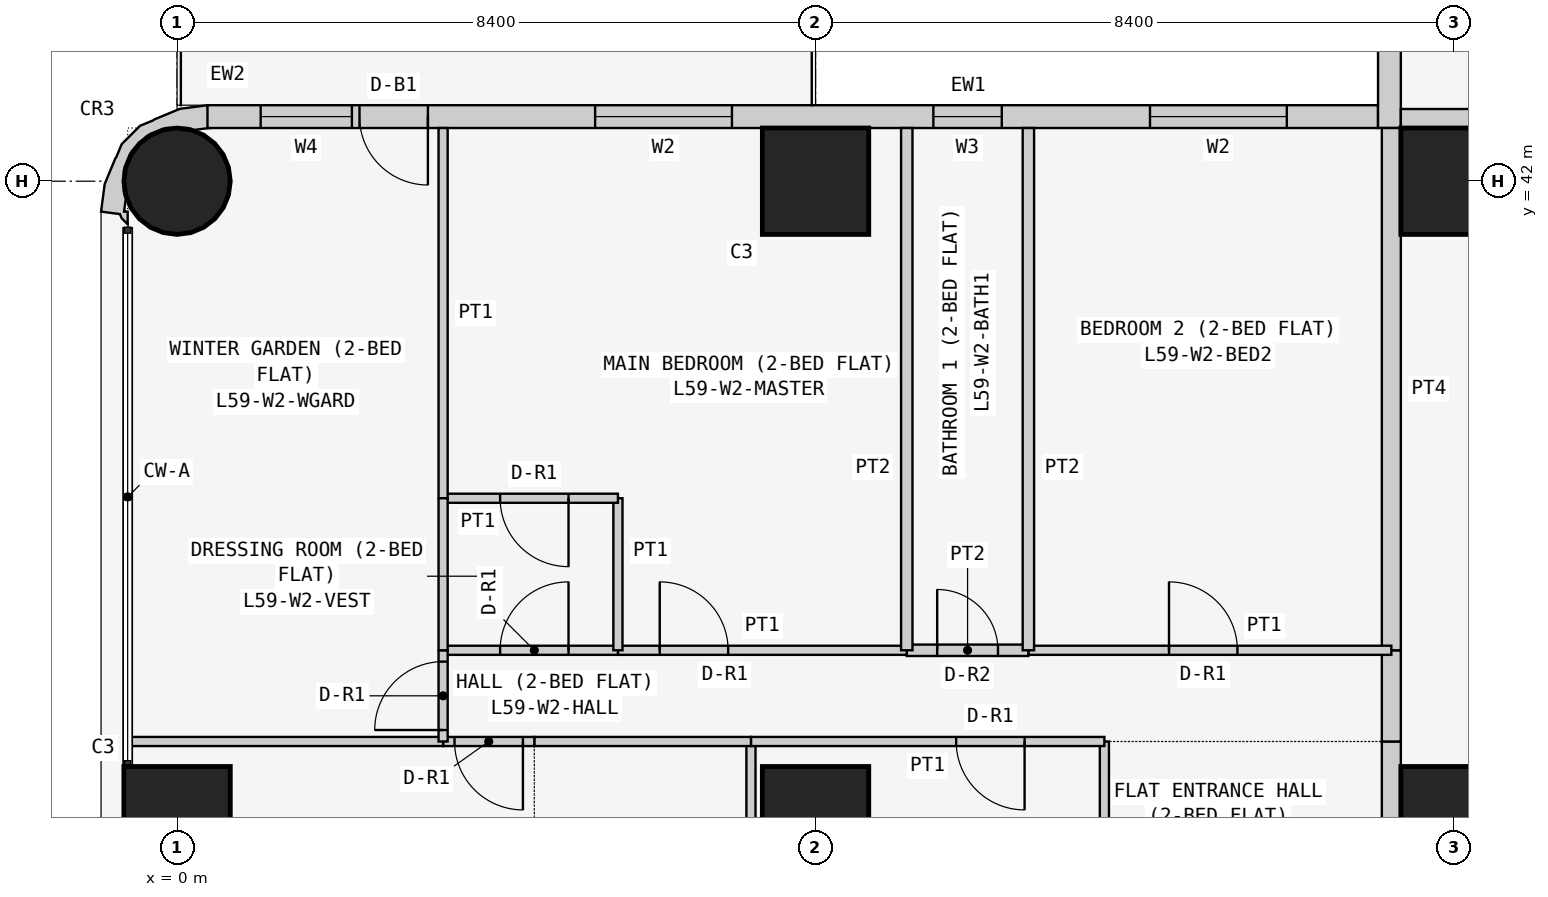
"""IFC4 building model, lengths in metres.
Left out: names, types, materials, properties, quantities, classifications, styles, units other than length and angle.
Written with IfcOpenShell. Run it as: python <this file> out.ifc"""

import sys

from ifc_helpers import new_model, si_unit, direction, frame, frame_2d, origin, origin_2d, place, context, subcontext, project, spatial, polyline, rectangle, circle, outline, extrude, element, fill, save


model = new_model("IFC4")
c1 = context("Model", 3, precision=1e-05, world=origin(), true_north=direction((0.0, 1.0)))
c2 = subcontext(c1, "Body", "Model", "MODEL_VIEW")
j1 = project(units=[si_unit("LENGTHUNIT", "METRE"), si_unit("PLANEANGLEUNIT", "RADIAN")], contexts=[c1])
p1 = place(None, origin())
s1 = spatial("IfcSite", under=j1, at=p1, CompositionType="ELEMENT")
p2 = place(p1, origin())
s2 = spatial("IfcBuilding", under=s1, at=p2, CompositionType="ELEMENT")
p3 = place(p2, frame((0.0, 0.0, 226.5)))
s3 = spatial("IfcBuildingStorey", under=s2, at=p3, CompositionType="ELEMENT", Elevation=226.5)
p4 = place(p3, frame((0.0, 33.6, 0.0), z_axis=(0.0, 0.0, 1.0), x_axis=(1.0, 0.0, 0.0)))
e1 = element("IfcColumn", 1, at=p4, inside=s3, PredefinedType="COLUMN", context=c2, shape_type="SweptSolid", body=[
    extrude(rectangle(XDim=1.4, YDim=1.4, at=origin_2d()), origin(), (0.0, 0.0, 1.0), 3.6),
])
p5 = place(p3, frame((0.0, 42.0, 0.0), z_axis=(0.0, 0.0, 1.0), x_axis=(1.0, 0.0, 0.0)))
e2 = element("IfcColumn", 2, at=p5, inside=s3, PredefinedType="COLUMN", context=c2, shape_type="SweptSolid", body=[
    extrude(circle(Radius=0.7, at=origin_2d()), origin(), (0.0, 0.0, 1.0), 3.6),
])
for number, where, z_axis, x_axis in (
    (3, (8.4, 33.6, 0.0), (0.0, 0.0, 1.0), (1.0, 0.0, 0.0)),
    (4, (8.4, 42.0, 0.0), (0.0, 0.0, 1.0), (1.0, 0.0, 0.0)),
    (5, (16.8, 33.6, 0.0), (0.0, 0.0, 1.0), (1.0, 0.0, 0.0)),
    (6, (16.8, 42.0, 0.0), (0.0, 0.0, 1.0), (1.0, 0.0, 0.0)),
):
    element("IfcColumn", number, at=place(p3, frame(where, z_axis=z_axis, x_axis=x_axis)), inside=s3, PredefinedType="COLUMN", context=c2, shape_type="SweptSolid", body=[
        extrude(rectangle(XDim=1.4, YDim=1.4, at=origin_2d()), origin(), (0.0, 0.0, 1.0), 3.6),
    ])
p6 = place(p3, frame((15.8, 42.85, 0.0), z_axis=(0.0, 0.0, 1.0), x_axis=(-1.0, 0.0, 0.0)))
e7 = element("IfcWall", 7, at=p6, inside=s3, PredefinedType="SOLIDWALL", context=c2, shape_type="SweptSolid", body=[
    extrude(rectangle(XDim=15.4, YDim=0.3, at=frame_2d((7.7, 0.0))), origin(), (0.0, 0.0, 1.0), 3.45),
])
p7 = place(p6, frame((1.2, 0.0, 0.9)))
e8 = element("IfcOpeningElement", 8, at=p7, cuts=e7, PredefinedType="OPENING", context=c2, shape_type="SweptSolid", body=[
    extrude(rectangle(XDim=1.8, YDim=1.5, at=frame_2d((0.9, 0.75))), frame((0.0, 0.16, 0.0), z_axis=(0.0, -1.0, 0.0), x_axis=(1.0, 0.0, 0.0)), (0.0, 0.0, 1.0), 0.32),
])
p8 = place(p6, frame((4.95, 0.0, 1.5)))
e9 = element("IfcOpeningElement", 9, at=p8, cuts=e7, PredefinedType="OPENING", context=c2, shape_type="SweptSolid", body=[
    extrude(rectangle(XDim=0.9, YDim=0.7, at=frame_2d((0.45, 0.35))), frame((0.0, 0.16, 0.0), z_axis=(0.0, -1.0, 0.0), x_axis=(1.0, 0.0, 0.0)), (0.0, 0.0, 1.0), 0.32),
])
p9 = place(p6, frame((8.5, 0.0, 0.9)))
e10 = element("IfcOpeningElement", 10, at=p9, cuts=e7, PredefinedType="OPENING", context=c2, shape_type="SweptSolid", body=[
    extrude(rectangle(XDim=1.8, YDim=1.5, at=frame_2d((0.9, 0.75))), frame((0.0, 0.16, 0.0), z_axis=(0.0, -1.0, 0.0), x_axis=(1.0, 0.0, 0.0)), (0.0, 0.0, 1.0), 0.32),
])
p10 = place(p6, frame((12.5, 0.0, 0.0)))
e11 = element("IfcOpeningElement", 11, at=p10, cuts=e7, PredefinedType="OPENING", context=c2, shape_type="SweptSolid", body=[
    extrude(rectangle(XDim=0.9, YDim=2.4, at=frame_2d((0.45, 1.2))), frame((0.0, 0.16, 0.0), z_axis=(0.0, -1.0, 0.0), x_axis=(1.0, 0.0, 0.0)), (0.0, 0.0, 1.0), 0.32),
])
p11 = place(p6, frame((13.5, 0.0, 0.9)))
e12 = element("IfcOpeningElement", 12, at=p11, cuts=e7, PredefinedType="OPENING", context=c2, shape_type="SweptSolid", body=[
    extrude(rectangle(XDim=1.2, YDim=1.5, at=frame_2d((0.6, 0.75))), frame((0.0, 0.16, 0.0), z_axis=(0.0, -1.0, 0.0), x_axis=(1.0, 0.0, 0.0)), (0.0, 0.0, 1.0), 0.32),
])
p12 = place(p3, frame((15.95, 50.0, 0.0), z_axis=(0.0, 0.0, 1.0), x_axis=(0.0, -1.0, 0.0)))
e13 = element("IfcWall", 13, at=p12, inside=s3, PredefinedType="SOLIDWALL", context=c2, shape_type="SweptSolid", body=[
    extrude(rectangle(XDim=7.3, YDim=0.3, at=frame_2d((3.65, 0.0))), origin(), (0.0, 0.0, 1.0), 3.45),
])
p13 = place(p12, frame((3.1, 0.0, 0.9)))
e14 = element("IfcOpeningElement", 14, at=p13, cuts=e13, PredefinedType="OPENING", context=c2, shape_type="SweptSolid", body=[
    extrude(rectangle(XDim=2.4, YDim=1.5, at=frame_2d((1.2, 0.75))), frame((0.0, 0.16, 0.0), z_axis=(0.0, -1.0, 0.0), x_axis=(1.0, 0.0, 0.0)), (0.0, 0.0, 1.0), 0.32),
])
p14 = place(p12, frame((0.75, 0.0, 0.9)))
e15 = element("IfcOpeningElement", 15, at=p14, cuts=e13, PredefinedType="OPENING", context=c2, shape_type="SweptSolid", body=[
    extrude(rectangle(XDim=1.2, YDim=1.5, at=frame_2d((0.6, 0.75))), frame((0.0, 0.16, 0.0), z_axis=(0.0, -1.0, 0.0), x_axis=(1.0, 0.0, 0.0)), (0.0, 0.0, 1.0), 0.32),
])
p15 = place(p3, frame((0.29, 42.724, 0.0), z_axis=(0.0, 0.0, 1.0), x_axis=(-0.898030234854, 0.439933741929, 0.0)))
e16 = element("IfcWall", 16, at=p15, inside=s3, PredefinedType="SOLIDWALL", context=c2, shape_type="SweptSolid", body=[
    extrude(outline(polyline([(-0.145, -0.044), (0.022, -0.296), (0.327, -0.094), (0.568, 0.18), (0.578, 0.199), (0.7, 0.338), (0.811, 0.661), (0.799, 0.846), (0.803, 0.866), (0.78, 1.231), (0.664, 1.577), (0.426, 1.497), (0.382, 1.536), (0.276, 1.572), (0.349, 1.423), (0.392, 1.444), (0.453, 1.261), (0.51, 1.211), (0.632, 0.961), (0.65, 0.683), (0.56, 0.419), (0.375, 0.21), (0.125, 0.087), (0.05, 0.082), (-0.127, -0.035), (-0.145, -0.044)])), origin(), (0.0, 0.0, 1.0), 3.45),
])
p16 = place(p3, frame((16.1, 42.825, 0.0), z_axis=(0.0, 0.0, 1.0), x_axis=(1.0, 0.0, 0.0)))
e17 = element("IfcWall", 17, at=p16, inside=s3, PredefinedType="PARTITIONING", context=c2, shape_type="SweptSolid", body=[
    extrude(rectangle(XDim=6.871, YDim=0.25, at=frame_2d((3.436, 0.0))), origin(), (0.0, 0.0, 1.0), 3.45),
])
p17 = place(p3, frame((15.975, 29.4, 0.0), z_axis=(0.0, 0.0, 1.0), x_axis=(0.0, 1.0, 0.0)))
e18 = element("IfcWall", 18, at=p17, inside=s3, PredefinedType="PARTITIONING", context=c2, shape_type="SweptSolid", body=[
    extrude(rectangle(XDim=5.229, YDim=0.25, at=frame_2d((2.615, 0.0))), origin(), (0.0, 0.0, 1.0), 3.45),
])
p18 = place(p17, frame((2.1, 0.0, 0.0)))
e19 = element("IfcOpeningElement", 19, at=p18, cuts=e18, PredefinedType="OPENING", context=c2, shape_type="SweptSolid", body=[
    extrude(rectangle(XDim=1.0, YDim=2.1, at=frame_2d((0.5, 1.05))), frame((0.0, 0.135, 0.0), z_axis=(0.0, -1.0, 0.0), x_axis=(1.0, 0.0, 0.0)), (0.0, 0.0, 1.0), 0.27),
])
p19 = place(p3, frame((15.975, 34.629, 0.0), z_axis=(0.0, 0.0, 1.0), x_axis=(0.0, 1.0, 0.0)))
e20 = element("IfcWall", 20, at=p19, inside=s3, PredefinedType="PARTITIONING", context=c2, shape_type="SweptSolid", body=[
    extrude(rectangle(XDim=1.2, YDim=0.25, at=frame_2d((0.6, 0.0))), origin(), (0.0, 0.0, 1.0), 3.45),
])
p20 = place(p3, frame((15.975, 35.829, 0.0), z_axis=(0.0, 0.0, 1.0), x_axis=(0.0, 1.0, 0.0)))
e21 = element("IfcWall", 21, at=p20, inside=s3, PredefinedType="PARTITIONING", context=c2, shape_type="SweptSolid", body=[
    extrude(rectangle(XDim=6.871, YDim=0.25, at=frame_2d((3.436, 0.0))), origin(), (0.0, 0.0, 1.0), 3.45),
])
for number, where, z_axis, x_axis in (
    (22, (12.2, 29.4, 0.0), (0.0, 0.0, 1.0), (0.0, 1.0, 0.0)),
    (23, (7.55, 29.4, 0.0), (0.0, 0.0, 1.0), (0.0, 1.0, 0.0)),
):
    element("IfcWall", number, at=place(p3, frame(where, z_axis=z_axis, x_axis=x_axis)), inside=s3, PredefinedType="PARTITIONING", context=c2, shape_type="SweptSolid", body=[
        extrude(rectangle(XDim=5.229, YDim=0.12, at=frame_2d((2.615, 0.0))), origin(), (0.0, 0.0, 1.0), 3.45),
    ])
p21 = place(p3, frame((7.55, 34.629, 0.0), z_axis=(0.0, 0.0, 1.0), x_axis=(1.0, 0.0, 0.0)))
e24 = element("IfcWall", 24, at=p21, inside=s3, PredefinedType="PARTITIONING", context=c2, shape_type="SweptSolid", body=[
    extrude(rectangle(XDim=4.65, YDim=0.12, at=frame_2d((2.325, 0.0))), origin(), (0.0, 0.0, 1.0), 3.45),
])
p22 = place(p21, frame((2.7, 0.0, 0.0)))
e25 = element("IfcOpeningElement", 25, at=p22, cuts=e24, PredefinedType="OPENING", context=c2, shape_type="SweptSolid", body=[
    extrude(rectangle(XDim=0.9, YDim=2.1, at=frame_2d((0.45, 1.05))), frame((0.0, 0.07, 0.0), z_axis=(0.0, -1.0, 0.0), x_axis=(1.0, 0.0, 0.0)), (0.0, 0.0, 1.0), 0.14),
])
p23 = place(p3, frame((4.7, 34.629, 0.0), z_axis=(0.0, 0.0, 1.0), x_axis=(1.0, 0.0, 0.0)))
e26 = element("IfcWall", 26, at=p23, inside=s3, PredefinedType="PARTITIONING", context=c2, shape_type="SweptSolid", body=[
    extrude(rectangle(XDim=2.85, YDim=0.12, at=frame_2d((1.425, 0.0))), origin(), (0.0, 0.0, 1.0), 3.45),
])
p24 = place(p3, frame((3.5, 34.629, 0.0), z_axis=(0.0, 0.0, 1.0), x_axis=(1.0, 0.0, 0.0)))
e27 = element("IfcWall", 27, at=p24, inside=s3, PredefinedType="PARTITIONING", context=c2, shape_type="SweptSolid", body=[
    extrude(rectangle(XDim=1.2, YDim=0.12, at=frame_2d((0.6, 0.0))), origin(), (0.0, 0.0, 1.0), 3.45),
])
p25 = place(p24, frame((0.15, 0.0, 0.0)))
e28 = element("IfcOpeningElement", 28, at=p25, cuts=e27, PredefinedType="OPENING", context=c2, shape_type="SweptSolid", body=[
    extrude(rectangle(XDim=0.9, YDim=2.1, at=frame_2d((0.45, 1.05))), frame((0.0, 0.07, 0.0), z_axis=(0.0, -1.0, 0.0), x_axis=(1.0, 0.0, 0.0)), (0.0, 0.0, 1.0), 0.14),
])
p26 = place(p3, frame((-0.65, 34.629, 0.0), z_axis=(0.0, 0.0, 1.0), x_axis=(1.0, 0.0, 0.0)))
e29 = element("IfcWall", 29, at=p26, inside=s3, PredefinedType="PARTITIONING", context=c2, shape_type="SweptSolid", body=[
    extrude(rectangle(XDim=4.15, YDim=0.12, at=frame_2d((2.075, 0.0))), origin(), (0.0, 0.0, 1.0), 3.45),
])
p27 = place(p3, frame((11.2, 35.829, 0.0), z_axis=(0.0, 0.0, 1.0), x_axis=(1.0, 0.0, 0.0)))
e30 = element("IfcWall", 30, at=p27, inside=s3, PredefinedType="PARTITIONING", context=c2, shape_type="SweptSolid", body=[
    extrude(rectangle(XDim=4.775, YDim=0.12, at=frame_2d((2.388, 0.0))), origin(), (0.0, 0.0, 1.0), 3.45),
])
p28 = place(p27, frame((1.85, 0.0, 0.0)))
e31 = element("IfcOpeningElement", 31, at=p28, cuts=e30, PredefinedType="OPENING", context=c2, shape_type="SweptSolid", body=[
    extrude(rectangle(XDim=0.9, YDim=2.1, at=frame_2d((0.45, 1.05))), frame((0.0, 0.07, 0.0), z_axis=(0.0, -1.0, 0.0), x_axis=(1.0, 0.0, 0.0)), (0.0, 0.0, 1.0), 0.14),
])
p29 = place(p3, frame((9.6, 35.829, 0.0), z_axis=(0.0, 0.0, 1.0), x_axis=(1.0, 0.0, 0.0)))
e32 = element("IfcWall", 32, at=p29, inside=s3, PredefinedType="PARTITIONING", context=c2, shape_type="SweptSolid", body=[
    extrude(rectangle(XDim=1.6, YDim=0.15, at=frame_2d((0.8, 0.0))), origin(), (0.0, 0.0, 1.0), 3.45),
])
p30 = place(p29, frame((0.4, 0.0, 0.0)))
e33 = element("IfcOpeningElement", 33, at=p30, cuts=e32, PredefinedType="OPENING", context=c2, shape_type="SweptSolid", body=[
    extrude(rectangle(XDim=0.8, YDim=2.1, at=frame_2d((0.4, 1.05))), frame((0.0, 0.085, 0.0), z_axis=(0.0, -1.0, 0.0), x_axis=(1.0, 0.0, 0.0)), (0.0, 0.0, 1.0), 0.17),
])
p31 = place(p3, frame((5.8, 35.829, 0.0), z_axis=(0.0, 0.0, 1.0), x_axis=(1.0, 0.0, 0.0)))
e34 = element("IfcWall", 34, at=p31, inside=s3, PredefinedType="PARTITIONING", context=c2, shape_type="SweptSolid", body=[
    extrude(rectangle(XDim=3.8, YDim=0.12, at=frame_2d((1.9, 0.0))), origin(), (0.0, 0.0, 1.0), 3.45),
])
p32 = place(p31, frame((0.55, 0.0, 0.0)))
e35 = element("IfcOpeningElement", 35, at=p32, cuts=e34, PredefinedType="OPENING", context=c2, shape_type="SweptSolid", body=[
    extrude(rectangle(XDim=0.9, YDim=2.1, at=frame_2d((0.45, 1.05))), frame((0.0, 0.07, 0.0), z_axis=(0.0, -1.0, 0.0), x_axis=(1.0, 0.0, 0.0)), (0.0, 0.0, 1.0), 0.14),
])
p33 = place(p3, frame((3.5, 35.829, 0.0), z_axis=(0.0, 0.0, 1.0), x_axis=(1.0, 0.0, 0.0)))
e36 = element("IfcWall", 36, at=p33, inside=s3, PredefinedType="PARTITIONING", context=c2, shape_type="SweptSolid", body=[
    extrude(rectangle(XDim=2.3, YDim=0.12, at=frame_2d((1.15, 0.0))), origin(), (0.0, 0.0, 1.0), 3.45),
])
p34 = place(p33, frame((0.75, 0.0, 0.0)))
e37 = element("IfcOpeningElement", 37, at=p34, cuts=e36, PredefinedType="OPENING", context=c2, shape_type="SweptSolid", body=[
    extrude(rectangle(XDim=0.9, YDim=2.1, at=frame_2d((0.45, 1.05))), frame((0.0, 0.07, 0.0), z_axis=(0.0, -1.0, 0.0), x_axis=(1.0, 0.0, 0.0)), (0.0, 0.0, 1.0), 0.14),
])
p35 = place(p3, frame((3.5, 34.629, 0.0), z_axis=(0.0, 0.0, 1.0), x_axis=(0.0, 1.0, 0.0)))
e38 = element("IfcWall", 38, at=p35, inside=s3, PredefinedType="PARTITIONING", context=c2, shape_type="SweptSolid", body=[
    extrude(rectangle(XDim=1.2, YDim=0.12, at=frame_2d((0.6, 0.0))), origin(), (0.0, 0.0, 1.0), 3.45),
])
p36 = place(p35, frame((0.151, 0.0, 0.0)))
e39 = element("IfcOpeningElement", 39, at=p36, cuts=e38, PredefinedType="OPENING", context=c2, shape_type="SweptSolid", body=[
    extrude(rectangle(XDim=0.9, YDim=2.1, at=frame_2d((0.45, 1.05))), frame((0.0, 0.07, 0.0), z_axis=(0.0, -1.0, 0.0), x_axis=(1.0, 0.0, 0.0)), (0.0, 0.0, 1.0), 0.14),
])
for number, where, z_axis, x_axis in (
    (40, (11.2, 35.829, 0.0), (0.0, 0.0, 1.0), (0.0, 1.0, 0.0)),
    (41, (9.6, 35.829, 0.0), (0.0, 0.0, 1.0), (0.0, 1.0, 0.0)),
):
    element("IfcWall", number, at=place(p3, frame(where, z_axis=z_axis, x_axis=x_axis)), inside=s3, PredefinedType="PARTITIONING", context=c2, shape_type="SweptSolid", body=[
        extrude(rectangle(XDim=6.871, YDim=0.15, at=frame_2d((3.436, 0.0))), origin(), (0.0, 0.0, 1.0), 3.45),
    ])
p37 = place(p3, frame((5.8, 35.829, 0.0), z_axis=(0.0, 0.0, 1.0), x_axis=(0.0, 1.0, 0.0)))
e42 = element("IfcWall", 42, at=p37, inside=s3, PredefinedType="PARTITIONING", context=c2, shape_type="SweptSolid", body=[
    extrude(rectangle(XDim=2.0, YDim=0.12, at=frame_2d((1.0, 0.0))), origin(), (0.0, 0.0, 1.0), 3.45),
])
p38 = place(p3, frame((5.8, 37.829, 0.0), z_axis=(0.0, 0.0, 1.0), x_axis=(-1.0, 0.0, 0.0)))
e43 = element("IfcWall", 43, at=p38, inside=s3, PredefinedType="PARTITIONING", context=c2, shape_type="SweptSolid", body=[
    extrude(rectangle(XDim=2.3, YDim=0.12, at=frame_2d((1.15, 0.0))), origin(), (0.0, 0.0, 1.0), 3.45),
])
p39 = place(p38, frame((0.65, 0.0, 0.0)))
e44 = element("IfcOpeningElement", 44, at=p39, cuts=e43, PredefinedType="OPENING", context=c2, shape_type="SweptSolid", body=[
    extrude(rectangle(XDim=0.9, YDim=2.1, at=frame_2d((0.45, 1.05))), frame((0.0, 0.07, 0.0), z_axis=(0.0, -1.0, 0.0), x_axis=(1.0, 0.0, 0.0)), (0.0, 0.0, 1.0), 0.14),
])
p40 = place(p3, frame((3.5, 37.829, 0.0), z_axis=(0.0, 0.0, 1.0), x_axis=(0.0, 1.0, 0.0)))
e45 = element("IfcWall", 45, at=p40, inside=s3, PredefinedType="PARTITIONING", context=c2, shape_type="SweptSolid", body=[
    extrude(rectangle(XDim=4.871, YDim=0.12, at=frame_2d((2.436, 0.0))), origin(), (0.0, 0.0, 1.0), 3.45),
])
p41 = place(p3, frame((3.5, 35.829, 0.0), z_axis=(0.0, 0.0, 1.0), x_axis=(0.0, 1.0, 0.0)))
e46 = element("IfcWall", 46, at=p41, inside=s3, PredefinedType="PARTITIONING", context=c2, shape_type="SweptSolid", body=[
    extrude(rectangle(XDim=2.0, YDim=0.12, at=frame_2d((1.0, 0.0))), origin(), (0.0, 0.0, 1.0), 3.45),
])
p42 = place(p7, origin())
e47 = element("IfcWindow", 47, at=p42, inside=s3, PartitioningType="SINGLE_PANEL", PredefinedType="WINDOW", context=c2, shape_type="SweptSolid", body=[
    extrude(rectangle(XDim=1.8, YDim=1.5, at=frame_2d((0.9, 0.75))), frame((0.0, 0.03, 0.0), z_axis=(0.0, -1.0, 0.0), x_axis=(1.0, 0.0, 0.0)), (0.0, 0.0, 1.0), 0.06),
])
fill(e8, e47)
p43 = place(p8, origin())
e48 = element("IfcWindow", 48, at=p43, inside=s3, PartitioningType="SINGLE_PANEL", PredefinedType="WINDOW", context=c2, shape_type="SweptSolid", body=[
    extrude(rectangle(XDim=0.9, YDim=0.7, at=frame_2d((0.45, 0.35))), frame((0.0, 0.03, 0.0), z_axis=(0.0, -1.0, 0.0), x_axis=(1.0, 0.0, 0.0)), (0.0, 0.0, 1.0), 0.06),
])
fill(e9, e48)
p44 = place(p9, origin())
e49 = element("IfcWindow", 49, at=p44, inside=s3, PartitioningType="SINGLE_PANEL", PredefinedType="WINDOW", context=c2, shape_type="SweptSolid", body=[
    extrude(rectangle(XDim=1.8, YDim=1.5, at=frame_2d((0.9, 0.75))), frame((0.0, 0.03, 0.0), z_axis=(0.0, -1.0, 0.0), x_axis=(1.0, 0.0, 0.0)), (0.0, 0.0, 1.0), 0.06),
])
fill(e10, e49)
p45 = place(p10, origin())
e50 = element("IfcDoor", 50, at=p45, inside=s3, OperationType="SINGLE_SWING_LEFT", PredefinedType="DOOR", context=c2, shape_type="SweptSolid", body=[
    extrude(rectangle(XDim=0.9, YDim=2.4, at=frame_2d((0.45, 1.2))), frame((0.0, 0.025, 0.0), z_axis=(0.0, -1.0, 0.0), x_axis=(1.0, 0.0, 0.0)), (0.0, 0.0, 1.0), 0.05),
])
fill(e11, e50)
p46 = place(p11, origin())
e51 = element("IfcWindow", 51, at=p46, inside=s3, PartitioningType="SINGLE_PANEL", PredefinedType="WINDOW", context=c2, shape_type="SweptSolid", body=[
    extrude(rectangle(XDim=1.2, YDim=1.5, at=frame_2d((0.6, 0.75))), frame((0.0, 0.03, 0.0), z_axis=(0.0, -1.0, 0.0), x_axis=(1.0, 0.0, 0.0)), (0.0, 0.0, 1.0), 0.06),
])
fill(e12, e51)
p47 = place(p22, frame((0.9, 0.0, 0.0), z_axis=(0.0, 0.0, 1.0), x_axis=(-1.0, 0.0, 0.0)))
e52 = element("IfcDoor", 52, at=p47, inside=s3, OperationType="SINGLE_SWING_LEFT", PredefinedType="DOOR", context=c2, shape_type="SweptSolid", body=[
    extrude(rectangle(XDim=0.9, YDim=2.1, at=frame_2d((0.45, 1.05))), frame((0.0, 0.025, 0.0), z_axis=(0.0, -1.0, 0.0), x_axis=(1.0, 0.0, 0.0)), (0.0, 0.0, 1.0), 0.05),
])
fill(e25, e52)
p48 = place(p25, frame((0.9, 0.0, 0.0), z_axis=(0.0, 0.0, 1.0), x_axis=(-1.0, 0.0, 0.0)))
e53 = element("IfcDoor", 53, at=p48, inside=s3, OperationType="SINGLE_SWING_LEFT", PredefinedType="DOOR", context=c2, shape_type="SweptSolid", body=[
    extrude(rectangle(XDim=0.9, YDim=2.1, at=frame_2d((0.45, 1.05))), frame((0.0, 0.025, 0.0), z_axis=(0.0, -1.0, 0.0), x_axis=(1.0, 0.0, 0.0)), (0.0, 0.0, 1.0), 0.05),
])
fill(e28, e53)
p49 = place(p28, origin())
e54 = element("IfcDoor", 54, at=p49, inside=s3, OperationType="SINGLE_SWING_LEFT", PredefinedType="DOOR", context=c2, shape_type="SweptSolid", body=[
    extrude(rectangle(XDim=0.9, YDim=2.1, at=frame_2d((0.45, 1.05))), frame((0.0, 0.025, 0.0), z_axis=(0.0, -1.0, 0.0), x_axis=(1.0, 0.0, 0.0)), (0.0, 0.0, 1.0), 0.05),
])
fill(e31, e54)
p50 = place(p30, origin())
e55 = element("IfcDoor", 55, at=p50, inside=s3, OperationType="SINGLE_SWING_LEFT", PredefinedType="DOOR", context=c2, shape_type="SweptSolid", body=[
    extrude(rectangle(XDim=0.8, YDim=2.1, at=frame_2d((0.4, 1.05))), frame((0.0, 0.025, 0.0), z_axis=(0.0, -1.0, 0.0), x_axis=(1.0, 0.0, 0.0)), (0.0, 0.0, 1.0), 0.05),
])
fill(e33, e55)
p51 = place(p32, origin())
e56 = element("IfcDoor", 56, at=p51, inside=s3, OperationType="SINGLE_SWING_LEFT", PredefinedType="DOOR", context=c2, shape_type="SweptSolid", body=[
    extrude(rectangle(XDim=0.9, YDim=2.1, at=frame_2d((0.45, 1.05))), frame((0.0, 0.025, 0.0), z_axis=(0.0, -1.0, 0.0), x_axis=(1.0, 0.0, 0.0)), (0.0, 0.0, 1.0), 0.05),
])
fill(e35, e56)
p52 = place(p34, origin())
e57 = element("IfcDoor", 57, at=p52, inside=s3, OperationType="SINGLE_SWING_RIGHT", PredefinedType="DOOR", context=c2, shape_type="SweptSolid", body=[
    extrude(rectangle(XDim=0.9, YDim=2.1, at=frame_2d((0.45, 1.05))), frame((0.0, 0.025, 0.0), z_axis=(0.0, -1.0, 0.0), x_axis=(1.0, 0.0, 0.0)), (0.0, 0.0, 1.0), 0.05),
])
fill(e37, e57)
p53 = place(p39, origin())
e58 = element("IfcDoor", 58, at=p53, inside=s3, OperationType="SINGLE_SWING_LEFT", PredefinedType="DOOR", context=c2, shape_type="SweptSolid", body=[
    extrude(rectangle(XDim=0.9, YDim=2.1, at=frame_2d((0.45, 1.05))), frame((0.0, 0.025, 0.0), z_axis=(0.0, -1.0, 0.0), x_axis=(1.0, 0.0, 0.0)), (0.0, 0.0, 1.0), 0.05),
])
fill(e44, e58)
p54 = place(p36, origin())
e59 = element("IfcDoor", 59, at=p54, inside=s3, OperationType="SINGLE_SWING_LEFT", PredefinedType="DOOR", context=c2, shape_type="SweptSolid", body=[
    extrude(rectangle(XDim=0.9, YDim=2.1, at=frame_2d((0.45, 1.05))), frame((0.0, 0.025, 0.0), z_axis=(0.0, -1.0, 0.0), x_axis=(1.0, 0.0, 0.0)), (0.0, 0.0, 1.0), 0.05),
])
fill(e39, e59)
save(model, sys.argv[1])
